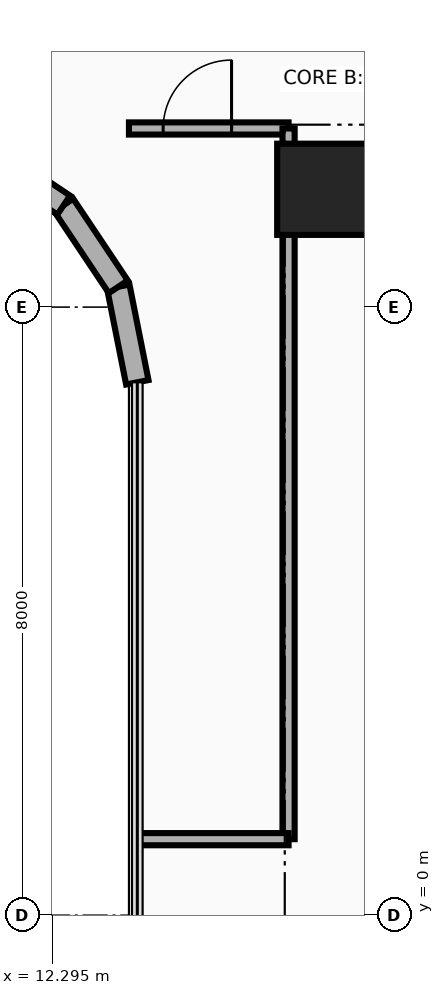
"""IFC4 building model, lengths in metres.
Left out: names, types, materials, properties, quantities, classifications, styles, units other than length and angle.
Written with IfcOpenShell. Run it as: python <this file> out.ifc"""

import sys

from ifc_helpers import new_model, si_unit, direction, frame, frame_2d, origin, origin_2d, place, context, subcontext, project, spatial, rectangle, extrude, source, transform, mapped, element, fill, save


model = new_model("IFC4")
c1 = context("Model", 3, precision=1e-05, world=origin(), true_north=direction((0.0, 1.0)))
c2 = subcontext(c1, "Body", "Model", "MODEL_VIEW")
j1 = project(units=[si_unit("LENGTHUNIT", "METRE"), si_unit("PLANEANGLEUNIT", "RADIAN")], contexts=[c1])
p1 = place(None, origin())
s1 = spatial("IfcSite", under=j1, at=p1, CompositionType="ELEMENT")
p2 = place(p1, origin())
s2 = spatial("IfcBuilding", under=s1, at=p2, CompositionType="ELEMENT")
p3 = place(p2, frame((0.0, 0.0, 127.9)))
s3 = spatial("IfcBuildingStorey", under=s2, at=p3, CompositionType="ELEMENT", Elevation=127.9)
p4 = place(p3, frame((15.85, 9.55, 0.0), z_axis=(0.0, 0.0, 1.0), x_axis=(1.0, 0.0, 0.0)))
e1 = element("IfcWall", 1, at=p4, inside=s3, PredefinedType="SHEAR", context=c2, shape_type="SweptSolid", body=[
    extrude(rectangle(XDim=9.0, YDim=0.7, at=frame_2d((4.5, 0.0))), origin(), (0.0, 0.0, 1.0), 3.46),
])
m1 = source(origin(), c2, "Body", "SweptSolid", [
    extrude(rectangle(XDim=1.2, YDim=1.2, at=origin_2d()), origin(), (0.0, 0.0, 1.0), 3.7),
])
p5 = place(p3, frame((15.85, 9.55, 0.0), z_axis=(0.0, 0.0, 1.0), x_axis=(1.0, 0.0, 0.0)))
e2 = element("IfcColumn", 2, at=p5, inside=s3, PredefinedType="COLUMN", context=c2, shape_type="MappedRepresentation", body=[
    mapped(m1, transform((0.0, 0.0, 0.0), x_axis=(1.0, 0.0, 0.0), y_axis=(0.0, 1.0, 0.0), z_axis=(0.0, 0.0, 1.0), scale=1.0)),
])
p6 = place(p3, frame((13.41, 7.011, 0.0), z_axis=(0.0, 0.0, 1.0), x_axis=(-0.195090163074, 0.980785312019, 0.0)))
e3 = element("IfcWall", 3, at=p6, inside=s3, PredefinedType="SOLIDWALL", context=c2, shape_type="SweptSolid", body=[
    extrude(rectangle(XDim=1.281, YDim=0.3, at=frame_2d((0.641, 0.0))), origin(), (0.0, 0.0, 1.0), 3.46),
])
for number, where, z_axis, x_axis in (
    (4, (13.16, 8.268, 0.0), (0.0, 0.0, 1.0), (-0.556, 0.831, 0.0)),
    (5, (12.442, 9.342, 0.0), (0.0, 0.0, 1.0), (-0.831, 0.556, 0.0)),
):
    element("IfcWall", number, at=place(p3, frame(where, z_axis=z_axis, x_axis=x_axis)), inside=s3, PredefinedType="SOLIDWALL", context=c2, shape_type="SweptSolid", body=[
        extrude(rectangle(XDim=1.292, YDim=0.3, at=frame_2d((0.646, 0.0))), origin(), (0.0, 0.0, 1.0), 3.46),
    ])
p7 = place(p3, frame((13.3, 10.35, 0.0), z_axis=(0.0, 0.0, 1.0), x_axis=(1.0, 0.0, 0.0)))
e6 = element("IfcWall", 6, at=p7, inside=s3, PredefinedType="PARTITIONING", context=c2, shape_type="SweptSolid", body=[
    extrude(rectangle(XDim=2.1, YDim=0.16, at=frame_2d((1.05, 0.0))), origin(), (0.0, 0.0, 1.0), 2.666),
])
p8 = place(p7, frame((0.45, 0.0, 0.0)))
e7 = element("IfcOpeningElement", 7, at=p8, cuts=e6, PredefinedType="OPENING", context=c2, shape_type="SweptSolid", body=[
    extrude(rectangle(XDim=0.9, YDim=2.1, at=frame_2d((0.45, 1.05))), frame((0.0, 0.095, 0.0), z_axis=(0.0, -1.0, 0.0), x_axis=(1.0, 0.0, 0.0)), (0.0, 0.0, 1.0), 0.19),
])
p9 = place(p3, frame((15.4, 1.0, 0.0), z_axis=(0.0, 0.0, 1.0), x_axis=(0.0, 1.0, 0.0)))
e8 = element("IfcWall", 8, at=p9, inside=s3, PredefinedType="PARTITIONING", context=c2, shape_type="SweptSolid", body=[
    extrude(rectangle(XDim=9.35, YDim=0.16, at=frame_2d((4.675, 0.0))), origin(), (0.0, 0.0, 1.0), 2.245),
])
p10 = place(p3, frame((13.41, 1.0, 0.0), z_axis=(0.0, 0.0, 1.0), x_axis=(1.0, 0.0, 0.0)))
e9 = element("IfcWall", 9, at=p10, inside=s3, PredefinedType="PARTITIONING", context=c2, shape_type="SweptSolid", body=[
    extrude(rectangle(XDim=1.99, YDim=0.16, at=frame_2d((0.995, 0.0))), origin(), (0.0, 0.0, 1.0), 2.245),
])
p11 = place(p8, origin())
e10 = element("IfcDoor", 10, at=p11, inside=s3, OperationType="SINGLE_SWING_LEFT", PredefinedType="DOOR", context=c2, shape_type="SweptSolid", body=[
    extrude(rectangle(XDim=0.9, YDim=2.1, at=frame_2d((0.45, 1.05))), frame((0.0, 0.025, 0.0), z_axis=(0.0, -1.0, 0.0), x_axis=(1.0, 0.0, 0.0)), (0.0, 0.0, 1.0), 0.05),
])
fill(e7, e10)
save(model, sys.argv[1])
